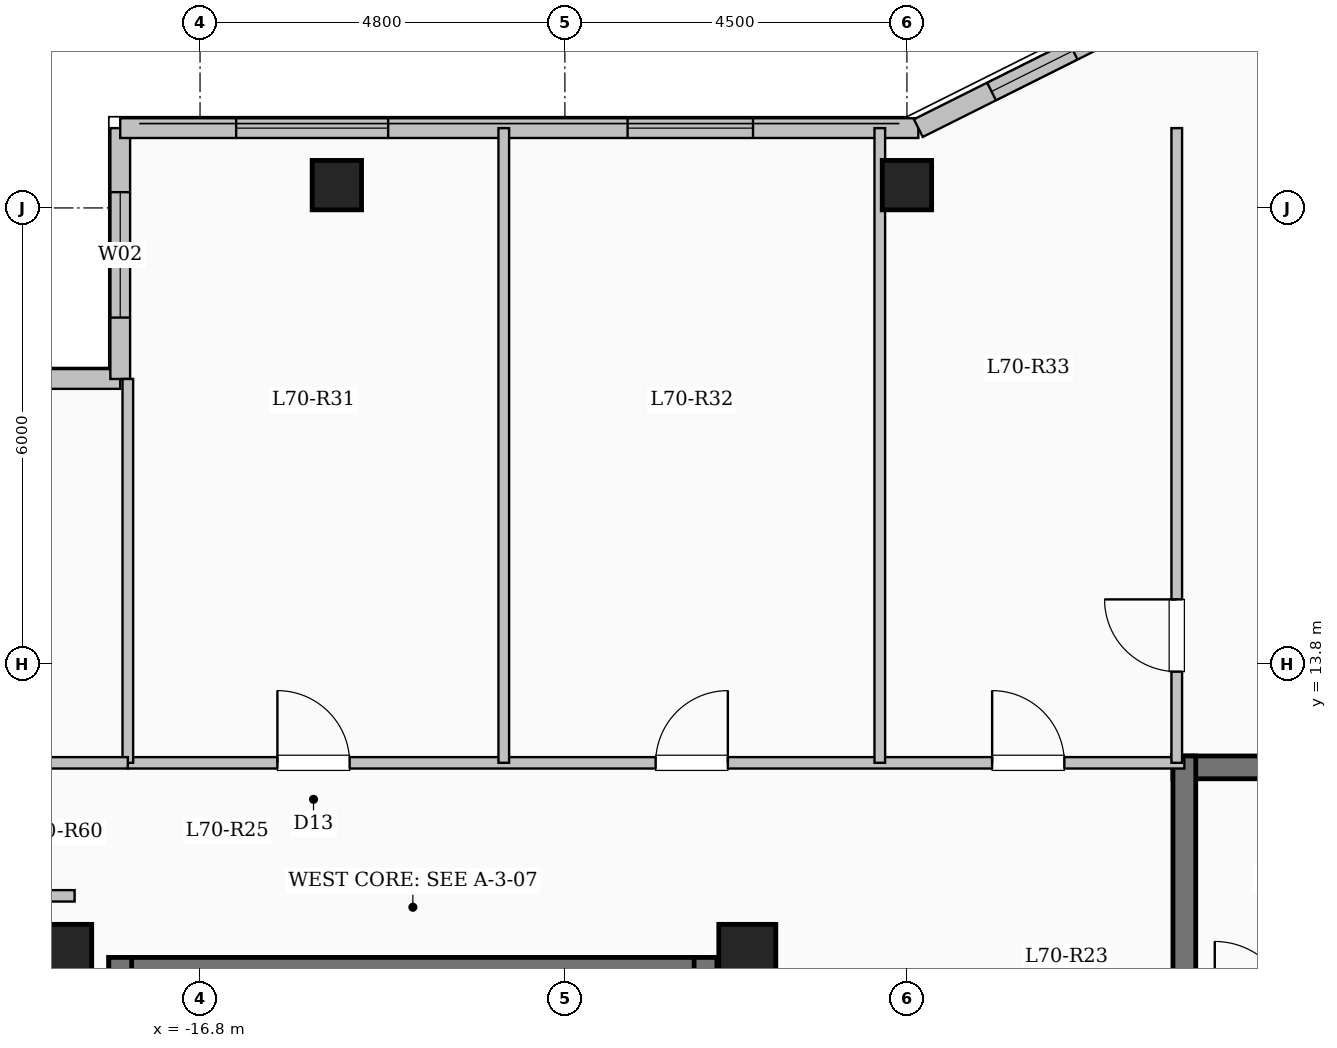
"""IFC4 building model, lengths in metres.
Left out: names, types, materials, properties, quantities, classifications, styles, units other than length and angle.
Written with IfcOpenShell. Run it as: python <this file> out.ifc"""

import sys

from ifc_helpers import new_model, si_unit, direction, frame, frame_2d, origin, origin_2d, place, context, subcontext, project, spatial, rectangle, extrude, element, fill, save


model = new_model("IFC4")
c1 = context("Model", 3, precision=1e-05, world=origin(), true_north=direction((0.0, 1.0)))
c2 = subcontext(c1, "Body", "Model", "MODEL_VIEW")
j1 = project(units=[si_unit("LENGTHUNIT", "METRE"), si_unit("PLANEANGLEUNIT", "RADIAN")], contexts=[c1])
p1 = place(None, origin())
s1 = spatial("IfcSite", under=j1, at=p1, CompositionType="ELEMENT")
p2 = place(p1, origin())
s2 = spatial("IfcBuilding", under=s1, at=p2, CompositionType="ELEMENT")
p3 = place(p2, frame((0.0, 0.0, 258.25)))
s3 = spatial("IfcBuildingStorey", under=s2, at=p3, CompositionType="ELEMENT", Elevation=258.25)
for number, where, z_axis, x_axis in (
    (1, (-9.6, 10.0, 0.0), (0.0, 0.0, 1.0), (1.0, 0.0, 0.0)),
    (2, (-18.6, 10.0, 0.0), (0.0, 0.0, 1.0), (1.0, 0.0, 0.0)),
):
    element("IfcColumn", number, at=place(p3, frame(where, z_axis=z_axis, x_axis=x_axis)), inside=s3, PredefinedType="COLUMN", context=c2, shape_type="SweptSolid", body=[
        extrude(rectangle(XDim=0.75, YDim=0.75, at=origin_2d()), origin(), (0.0, 0.0, 1.0), 3.35),
    ])
for number, where, z_axis, x_axis in (
    (3, (-15.0, 20.1, 0.0), (0.0, 0.0, 1.0), (1.0, 0.0, 0.0)),
    (4, (-7.5, 20.1, 0.0), (0.0, 0.0, 1.0), (1.0, 0.0, 0.0)),
):
    element("IfcColumn", number, at=place(p3, frame(where, z_axis=z_axis, x_axis=x_axis)), inside=s3, PredefinedType="COLUMN", context=c2, shape_type="SweptSolid", body=[
        extrude(rectangle(XDim=0.65, YDim=0.65, at=origin_2d()), origin(), (0.0, 0.0, 1.0), 3.35),
    ])
p4 = place(p3, frame((-22.65, 17.55, 0.0), z_axis=(0.0, 0.0, 1.0), x_axis=(1.0, 0.0, 0.0)))
e5 = element("IfcWall", 5, at=p4, inside=s3, PredefinedType="SOLIDWALL", context=c2, shape_type="SweptSolid", body=[
    extrude(rectangle(XDim=4.8, YDim=0.26, at=frame_2d((2.4, 0.0))), origin(), (0.0, 0.0, 1.0), 3.1),
])
p5 = place(p4, frame((1.425, 0.0, 0.9)))
e6 = element("IfcOpeningElement", 6, at=p5, cuts=e5, PredefinedType="OPENING", context=c2, shape_type="SweptSolid", body=[
    extrude(rectangle(XDim=2.0, YDim=1.7, at=frame_2d((1.0, 0.85))), frame((0.0, 0.14, 0.0), z_axis=(0.0, -1.0, 0.0), x_axis=(1.0, 0.0, 0.0)), (0.0, 0.0, 1.0), 0.28),
])
p6 = place(p3, frame((-17.85, 17.55, 0.0), z_axis=(0.0, 0.0, 1.0), x_axis=(0.0, 1.0, 0.0)))
e7 = element("IfcWall", 7, at=p6, inside=s3, PredefinedType="SOLIDWALL", context=c2, shape_type="SweptSolid", body=[
    extrude(rectangle(XDim=3.3, YDim=0.26, at=frame_2d((1.65, 0.0))), origin(), (0.0, 0.0, 1.0), 3.1),
])
p7 = place(p6, frame((0.808, 0.0, 0.9)))
e8 = element("IfcOpeningElement", 8, at=p7, cuts=e7, PredefinedType="OPENING", context=c2, shape_type="SweptSolid", body=[
    extrude(rectangle(XDim=1.65, YDim=1.6, at=frame_2d((0.825, 0.8))), frame((0.0, 0.14, 0.0), z_axis=(0.0, -1.0, 0.0), x_axis=(1.0, 0.0, 0.0)), (0.0, 0.0, 1.0), 0.28),
])
p8 = place(p3, frame((-17.85, 20.85, 0.0), z_axis=(0.0, 0.0, 1.0), x_axis=(1.0, 0.0, 0.0)))
e9 = element("IfcWall", 9, at=p8, inside=s3, PredefinedType="SOLIDWALL", context=c2, shape_type="SweptSolid", body=[
    extrude(rectangle(XDim=10.5, YDim=0.26, at=frame_2d((5.25, 0.0))), origin(), (0.0, 0.0, 1.0), 3.1),
])
p9 = place(p8, frame((1.525, 0.0, 0.9)))
e10 = element("IfcOpeningElement", 10, at=p9, cuts=e9, PredefinedType="OPENING", context=c2, shape_type="SweptSolid", body=[
    extrude(rectangle(XDim=2.0, YDim=1.7, at=frame_2d((1.0, 0.85))), frame((0.0, 0.14, 0.0), z_axis=(0.0, -1.0, 0.0), x_axis=(1.0, 0.0, 0.0)), (0.0, 0.0, 1.0), 0.28),
])
p10 = place(p8, frame((6.675, 0.0, 0.9)))
e11 = element("IfcOpeningElement", 11, at=p10, cuts=e9, PredefinedType="OPENING", context=c2, shape_type="SweptSolid", body=[
    extrude(rectangle(XDim=1.65, YDim=1.6, at=frame_2d((0.825, 0.8))), frame((0.0, 0.14, 0.0), z_axis=(0.0, -1.0, 0.0), x_axis=(1.0, 0.0, 0.0)), (0.0, 0.0, 1.0), 0.28),
])
p11 = place(p3, frame((-7.35, 20.85, 0.0), z_axis=(0.0, 0.0, 1.0), x_axis=(0.894427191, 0.4472135955, 0.0)))
e12 = element("IfcWall", 12, at=p11, inside=s3, PredefinedType="SOLIDWALL", context=c2, shape_type="SweptSolid", body=[
    extrude(rectangle(XDim=3.354, YDim=0.26, at=frame_2d((1.677, 0.0))), origin(), (0.0, 0.0, 1.0), 3.1),
])
p12 = place(p11, frame((1.077, 0.0, 0.95)))
e13 = element("IfcOpeningElement", 13, at=p12, cuts=e12, PredefinedType="OPENING", context=c2, shape_type="SweptSolid", body=[
    extrude(rectangle(XDim=1.2, YDim=1.5, at=frame_2d((0.6, 0.75))), frame((0.0, 0.14, 0.0), z_axis=(0.0, -1.0, 0.0), x_axis=(1.0, 0.0, 0.0)), (0.0, 0.0, 1.0), 0.28),
])
p13 = place(p3, frame((-18.0, 9.79, 0.0), z_axis=(0.0, 0.0, 1.0), x_axis=(1.0, 0.0, 0.0)))
e14 = element("IfcWall", 14, at=p13, inside=s3, PredefinedType="SHEAR", context=c2, shape_type="SweptSolid", body=[
    extrude(rectangle(XDim=8.0, YDim=0.3, at=frame_2d((4.0, 0.0))), origin(), (0.0, 0.0, 1.0), 3.35),
])
for number, where, z_axis, x_axis in (
    (15, (-17.85, 6.35, 0.0), (0.0, 0.0, 1.0), (0.0, 1.0, 0.0)),
    (16, (-10.15, 6.35, 0.0), (0.0, 0.0, 1.0), (0.0, 1.0, 0.0)),
):
    element("IfcWall", number, at=place(p3, frame(where, z_axis=z_axis, x_axis=x_axis)), inside=s3, PredefinedType="SHEAR", context=c2, shape_type="SweptSolid", body=[
        extrude(rectangle(XDim=3.59, YDim=0.3, at=frame_2d((1.795, 0.0))), origin(), (0.0, 0.0, 1.0), 3.35),
    ])
p14 = place(p3, frame((-4.0, 12.44, 0.0), z_axis=(0.0, 0.0, 1.0), x_axis=(1.0, 0.0, 0.0)))
e17 = element("IfcWall", 17, at=p14, inside=s3, PredefinedType="SHEAR", context=c2, shape_type="SweptSolid", body=[
    extrude(rectangle(XDim=8.0, YDim=0.3, at=frame_2d((4.0, 0.0))), origin(), (0.0, 0.0, 1.0), 3.35),
])
p15 = place(p3, frame((-3.85, 9.0, 0.0), z_axis=(0.0, 0.0, 1.0), x_axis=(0.0, 1.0, 0.0)))
e18 = element("IfcWall", 18, at=p15, inside=s3, PredefinedType="SHEAR", context=c2, shape_type="SweptSolid", body=[
    extrude(rectangle(XDim=3.59, YDim=0.3, at=frame_2d((1.795, 0.0))), origin(), (0.0, 0.0, 1.0), 3.35),
])
p16 = place(p3, frame((-17.75, 12.5, 0.0), z_axis=(0.0, 0.0, 1.0), x_axis=(1.0, 0.0, 0.0)))
e19 = element("IfcWall", 19, at=p16, inside=s3, PredefinedType="PARTITIONING", context=c2, shape_type="SweptSolid", body=[
    extrude(rectangle(XDim=13.9, YDim=0.15, at=frame_2d((6.95, 0.0))), origin(), (0.0, 0.0, 1.0), 3.1),
])
p17 = place(p16, frame((1.968, 0.0, 0.0)))
e20 = element("IfcOpeningElement", 20, at=p17, cuts=e19, PredefinedType="OPENING", context=c2, shape_type="SweptSolid", body=[
    extrude(rectangle(XDim=0.95, YDim=2.15, at=frame_2d((0.475, 1.075))), frame((0.0, 0.085, 0.0), z_axis=(0.0, -1.0, 0.0), x_axis=(1.0, 0.0, 0.0)), (0.0, 0.0, 1.0), 0.17),
])
p18 = place(p16, frame((6.944, 0.0, 0.0)))
e21 = element("IfcOpeningElement", 21, at=p18, cuts=e19, PredefinedType="OPENING", context=c2, shape_type="SweptSolid", body=[
    extrude(rectangle(XDim=0.95, YDim=2.15, at=frame_2d((0.475, 1.075))), frame((0.0, 0.085, 0.0), z_axis=(0.0, -1.0, 0.0), x_axis=(1.0, 0.0, 0.0)), (0.0, 0.0, 1.0), 0.17),
])
p19 = place(p16, frame((11.371, 0.0, 0.0)))
e22 = element("IfcOpeningElement", 22, at=p19, cuts=e19, PredefinedType="OPENING", context=c2, shape_type="SweptSolid", body=[
    extrude(rectangle(XDim=0.95, YDim=2.15, at=frame_2d((0.475, 1.075))), frame((0.0, 0.085, 0.0), z_axis=(0.0, -1.0, 0.0), x_axis=(1.0, 0.0, 0.0)), (0.0, 0.0, 1.0), 0.17),
])
p20 = place(p3, frame((-3.95, 12.5, 0.0), z_axis=(0.0, 0.0, 1.0), x_axis=(0.0, 1.0, 0.0)))
e23 = element("IfcWall", 23, at=p20, inside=s3, PredefinedType="PARTITIONING", context=c2, shape_type="SweptSolid", body=[
    extrude(rectangle(XDim=8.35, YDim=0.14, at=frame_2d((4.175, 0.0))), origin(), (0.0, 0.0, 1.0), 3.1),
])
p21 = place(p20, frame((1.2, 0.0, 0.0)))
e24 = element("IfcOpeningElement", 24, at=p21, cuts=e23, PredefinedType="OPENING", context=c2, shape_type="SweptSolid", body=[
    extrude(rectangle(XDim=0.95, YDim=2.15, at=frame_2d((0.475, 1.075))), frame((0.0, 0.08, 0.0), z_axis=(0.0, -1.0, 0.0), x_axis=(1.0, 0.0, 0.0)), (0.0, 0.0, 1.0), 0.16),
])
p22 = place(p3, frame((-12.804, 12.5, 0.0), z_axis=(0.0, 0.0, 1.0), x_axis=(0.0, 1.0, 0.0)))
e25 = element("IfcWall", 25, at=p22, inside=s3, PredefinedType="PARTITIONING", context=c2, shape_type="SweptSolid", body=[
    extrude(rectangle(XDim=8.35, YDim=0.14, at=frame_2d((4.175, 0.0))), origin(), (0.0, 0.0, 1.0), 3.1),
])
p23 = place(p3, frame((-7.857, 12.5, 0.0), z_axis=(0.0, 0.0, 1.0), x_axis=(0.0, 1.0, 0.0)))
e26 = element("IfcWall", 26, at=p23, inside=s3, PredefinedType="PARTITIONING", context=c2, shape_type="SweptSolid", body=[
    extrude(rectangle(XDim=8.35, YDim=0.14, at=frame_2d((4.175, 0.0))), origin(), (0.0, 0.0, 1.0), 2.685),
])
p24 = place(p3, frame((-22.68, 10.75, 0.0), z_axis=(0.0, 0.0, 1.0), x_axis=(1.0, 0.0, 0.0)))
e27 = element("IfcWall", 27, at=p24, inside=s3, PredefinedType="PARTITIONING", context=c2, shape_type="SweptSolid", body=[
    extrude(rectangle(XDim=4.23, YDim=0.15, at=frame_2d((2.115, 0.0))), origin(), (0.0, 0.0, 1.0), 3.1),
])
p25 = place(p3, frame((-17.75, 12.5, 0.0), z_axis=(0.0, 0.0, 1.0), x_axis=(0.0, 1.0, 0.0)))
e28 = element("IfcWall", 28, at=p25, inside=s3, PredefinedType="PARTITIONING", context=c2, shape_type="SweptSolid", body=[
    extrude(rectangle(XDim=5.05, YDim=0.14, at=frame_2d((2.525, 0.0))), origin(), (0.0, 0.0, 1.0), 3.1),
])
p26 = place(p3, frame((-22.68, 12.5, 0.0), z_axis=(0.0, 0.0, 1.0), x_axis=(1.0, 0.0, 0.0)))
e29 = element("IfcWall", 29, at=p26, inside=s3, PredefinedType="PARTITIONING", context=c2, shape_type="SweptSolid", body=[
    extrude(rectangle(XDim=4.93, YDim=0.15, at=frame_2d((2.465, 0.0))), origin(), (0.0, 0.0, 1.0), 3.1),
])
p27 = place(p26, frame((1.99, 0.0, 0.0)))
e30 = element("IfcOpeningElement", 30, at=p27, cuts=e29, PredefinedType="OPENING", context=c2, shape_type="SweptSolid", body=[
    extrude(rectangle(XDim=0.95, YDim=2.15, at=frame_2d((0.475, 1.075))), frame((0.0, 0.085, 0.0), z_axis=(0.0, -1.0, 0.0), x_axis=(1.0, 0.0, 0.0)), (0.0, 0.0, 1.0), 0.17),
])
p28 = place(p7, origin())
e31 = element("IfcWindow", 31, at=p28, inside=s3, PartitioningType="SINGLE_PANEL", PredefinedType="WINDOW", context=c2, shape_type="SweptSolid", body=[
    extrude(rectangle(XDim=1.65, YDim=1.6, at=frame_2d((0.825, 0.8))), frame((0.0, 0.03, 0.0), z_axis=(0.0, -1.0, 0.0), x_axis=(1.0, 0.0, 0.0)), (0.0, 0.0, 1.0), 0.06),
])
fill(e8, e31)
p29 = place(p9, origin())
e32 = element("IfcWindow", 32, at=p29, inside=s3, PartitioningType="SINGLE_PANEL", PredefinedType="WINDOW", context=c2, shape_type="SweptSolid", body=[
    extrude(rectangle(XDim=2.0, YDim=1.7, at=frame_2d((1.0, 0.85))), frame((0.0, 0.03, 0.0), z_axis=(0.0, -1.0, 0.0), x_axis=(1.0, 0.0, 0.0)), (0.0, 0.0, 1.0), 0.06),
])
fill(e10, e32)
p30 = place(p10, origin())
e33 = element("IfcWindow", 33, at=p30, inside=s3, PartitioningType="SINGLE_PANEL", PredefinedType="WINDOW", context=c2, shape_type="SweptSolid", body=[
    extrude(rectangle(XDim=1.65, YDim=1.6, at=frame_2d((0.825, 0.8))), frame((0.0, 0.03, 0.0), z_axis=(0.0, -1.0, 0.0), x_axis=(1.0, 0.0, 0.0)), (0.0, 0.0, 1.0), 0.06),
])
fill(e11, e33)
p31 = place(p12, origin())
e34 = element("IfcWindow", 34, at=p31, inside=s3, PartitioningType="SINGLE_PANEL", PredefinedType="WINDOW", context=c2, shape_type="SweptSolid", body=[
    extrude(rectangle(XDim=1.2, YDim=1.5, at=frame_2d((0.6, 0.75))), frame((0.0, 0.03, 0.0), z_axis=(0.0, -1.0, 0.0), x_axis=(1.0, 0.0, 0.0)), (0.0, 0.0, 1.0), 0.06),
])
fill(e13, e34)
p32 = place(p17, origin())
e35 = element("IfcDoor", 35, at=p32, inside=s3, OperationType="SINGLE_SWING_LEFT", PredefinedType="DOOR", context=c2, shape_type="SweptSolid", body=[
    extrude(rectangle(XDim=0.95, YDim=2.15, at=frame_2d((0.475, 1.075))), frame((0.0, 0.025, 0.0), z_axis=(0.0, -1.0, 0.0), x_axis=(1.0, 0.0, 0.0)), (0.0, 0.0, 1.0), 0.05),
])
fill(e20, e35)
p33 = place(p18, origin())
e36 = element("IfcDoor", 36, at=p33, inside=s3, OperationType="SINGLE_SWING_RIGHT", PredefinedType="DOOR", context=c2, shape_type="SweptSolid", body=[
    extrude(rectangle(XDim=0.95, YDim=2.15, at=frame_2d((0.475, 1.075))), frame((0.0, 0.025, 0.0), z_axis=(0.0, -1.0, 0.0), x_axis=(1.0, 0.0, 0.0)), (0.0, 0.0, 1.0), 0.05),
])
fill(e21, e36)
p34 = place(p19, origin())
e37 = element("IfcDoor", 37, at=p34, inside=s3, OperationType="SINGLE_SWING_LEFT", PredefinedType="DOOR", context=c2, shape_type="SweptSolid", body=[
    extrude(rectangle(XDim=0.95, YDim=2.15, at=frame_2d((0.475, 1.075))), frame((0.0, 0.025, 0.0), z_axis=(0.0, -1.0, 0.0), x_axis=(1.0, 0.0, 0.0)), (0.0, 0.0, 1.0), 0.05),
])
fill(e22, e37)
p35 = place(p21, origin())
e38 = element("IfcDoor", 38, at=p35, inside=s3, OperationType="SINGLE_SWING_RIGHT", PredefinedType="DOOR", context=c2, shape_type="SweptSolid", body=[
    extrude(rectangle(XDim=0.95, YDim=2.15, at=frame_2d((0.475, 1.075))), frame((0.0, 0.025, 0.0), z_axis=(0.0, -1.0, 0.0), x_axis=(1.0, 0.0, 0.0)), (0.0, 0.0, 1.0), 0.05),
])
fill(e24, e38)
save(model, sys.argv[1])
